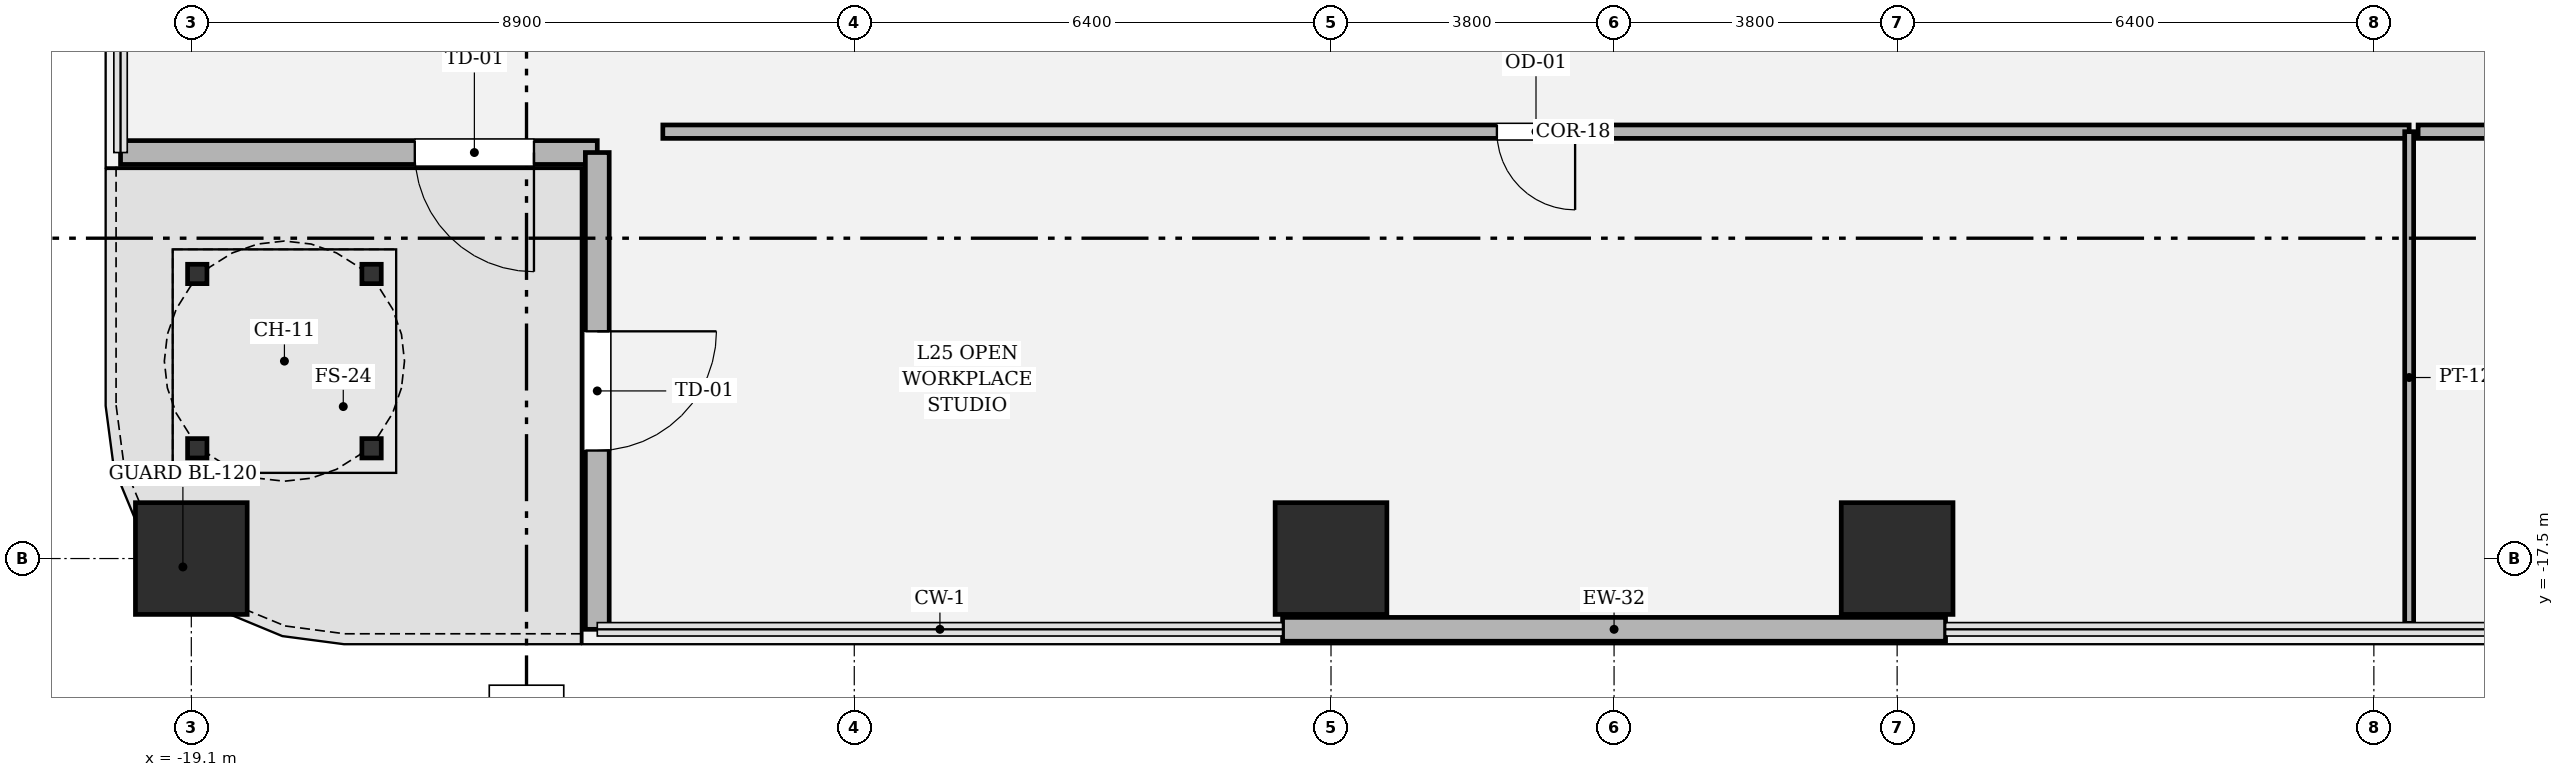
"""IFC4 building model, lengths in metres.
Left out: names, types, materials, properties, quantities, classifications, styles, units other than length and angle.
Written with IfcOpenShell. Run it as: python <this file> out.ifc"""

import sys

from ifc_helpers import new_model, si_unit, direction, frame, frame_2d, origin, origin_2d, place, context, subcontext, project, spatial, rectangle, hollow_rectangle, extrude, element, fill, save


model = new_model("IFC4")
c1 = context("Model", 3, precision=1e-05, world=origin(), true_north=direction((0.0, 1.0)))
c2 = subcontext(c1, "Body", "Model", "MODEL_VIEW")
j1 = project(units=[si_unit("LENGTHUNIT", "METRE"), si_unit("PLANEANGLEUNIT", "RADIAN")], contexts=[c1])
p1 = place(None, origin())
s1 = spatial("IfcSite", under=j1, at=p1, CompositionType="ELEMENT")
p2 = place(p1, origin())
s2 = spatial("IfcBuilding", under=s1, at=p2, CompositionType="ELEMENT")
p3 = place(p2, frame((0.0, 0.0, 109.2)))
s3 = spatial("IfcBuildingStorey", under=s2, at=p3, CompositionType="ELEMENT", Elevation=109.2)
for number, where, z_axis, x_axis in (
    (1, (-19.1, -17.5, 0.0), (0.0, 0.0, 1.0), (1.0, 0.0, 0.0)),
    (2, (-3.8, -17.5, 0.0), (0.0, 0.0, 1.0), (1.0, 0.0, 0.0)),
    (3, (3.8, -17.5, 0.0), (0.0, 0.0, 1.0), (1.0, 0.0, 0.0)),
):
    element("IfcColumn", number, at=place(p3, frame(where, z_axis=z_axis, x_axis=x_axis)), inside=s3, PredefinedType="COLUMN", context=c2, shape_type="SweptSolid", body=[
        extrude(hollow_rectangle(XDim=1.5, YDim=1.5, WallThickness=0.045, at=origin_2d()), origin(), (0.0, 0.0, 1.0), 4.05),
    ])
p4 = place(p3, frame((-4.45, -18.45, 0.0), z_axis=(0.0, 0.0, 1.0), x_axis=(1.0, 0.0, 0.0)))
e4 = element("IfcWall", 4, at=p4, inside=s3, PredefinedType="SOLIDWALL", context=c2, shape_type="SweptSolid", body=[
    extrude(rectangle(XDim=8.9, YDim=0.32, at=frame_2d((4.45, 0.0))), origin(), (0.0, 0.0, 1.0), 3.81),
])
p5 = place(p3, frame((-20.05, -12.05, 0.0), z_axis=(0.0, 0.0, 1.0), x_axis=(1.0, 0.0, 0.0)))
e5 = element("IfcWall", 5, at=p5, inside=s3, PredefinedType="SOLIDWALL", context=c2, shape_type="SweptSolid", body=[
    extrude(rectangle(XDim=6.4, YDim=0.32, at=frame_2d((3.2, 0.0))), origin(), (0.0, 0.0, 1.0), 3.104),
])
p6 = place(p5, frame((3.95, 0.0, 0.0)))
e6 = element("IfcOpeningElement", 6, at=p6, cuts=e5, PredefinedType="OPENING", context=c2, shape_type="SweptSolid", body=[
    extrude(rectangle(XDim=1.6, YDim=2.35, at=frame_2d((0.8, 1.175))), frame((0.0, 0.17, 0.0), z_axis=(0.0, -1.0, 0.0), x_axis=(1.0, 0.0, 0.0)), (0.0, 0.0, 1.0), 0.34),
])
p7 = place(p3, frame((-13.65, -12.05, 0.0), z_axis=(0.0, 0.0, 1.0), x_axis=(0.0, -1.0, 0.0)))
e7 = element("IfcWall", 7, at=p7, inside=s3, PredefinedType="SOLIDWALL", context=c2, shape_type="SweptSolid", body=[
    extrude(rectangle(XDim=6.4, YDim=0.32, at=frame_2d((3.2, 0.0))), origin(), (0.0, 0.0, 1.0), 3.104),
])
p8 = place(p7, frame((2.4, 0.0, 0.0)))
e8 = element("IfcOpeningElement", 8, at=p8, cuts=e7, PredefinedType="OPENING", context=c2, shape_type="SweptSolid", body=[
    extrude(rectangle(XDim=1.6, YDim=2.35, at=frame_2d((0.8, 1.175))), frame((0.0, 0.17, 0.0), z_axis=(0.0, -1.0, 0.0), x_axis=(1.0, 0.0, 0.0)), (0.0, 0.0, 1.0), 0.34),
])
p9 = place(p3, frame((-12.77, -11.77, 0.0), z_axis=(0.0, 0.0, 1.0), x_axis=(1.0, 0.0, 0.0)))
e9 = element("IfcWall", 9, at=p9, inside=s3, PredefinedType="PARTITIONING", context=c2, shape_type="SweptSolid", body=[
    extrude(rectangle(XDim=23.444, YDim=0.18, at=frame_2d((11.722, 0.0))), origin(), (0.0, 0.0, 1.0), 3.104),
])
p10 = place(p9, frame((11.197, 0.0, 0.0)))
e10 = element("IfcOpeningElement", 10, at=p10, cuts=e9, PredefinedType="OPENING", context=c2, shape_type="SweptSolid", body=[
    extrude(rectangle(XDim=1.05, YDim=2.2, at=frame_2d((0.525, 1.1))), frame((0.0, 0.1, 0.0), z_axis=(0.0, -1.0, 0.0), x_axis=(1.0, 0.0, 0.0)), (0.0, 0.0, 1.0), 0.2),
])
p11 = place(p3, frame((10.674, -11.77, 0.0), z_axis=(0.0, 0.0, 1.0), x_axis=(0.0, -1.0, 0.0)))
e11 = element("IfcWall", 11, at=p11, inside=s3, PredefinedType="PARTITIONING", context=c2, shape_type="SweptSolid", body=[
    extrude(rectangle(XDim=6.6, YDim=0.12, at=frame_2d((3.3, 0.0))), origin(), (0.0, 0.0, 1.0), 3.104),
])
p12 = place(p3, frame((10.794, -11.77, 0.0), z_axis=(0.0, 0.0, 1.0), x_axis=(1.0, 0.0, 0.0)))
e12 = element("IfcWall", 12, at=p12, inside=s3, PredefinedType="PARTITIONING", context=c2, shape_type="SweptSolid", body=[
    extrude(rectangle(XDim=5.476, YDim=0.18, at=frame_2d((2.738, 0.0))), origin(), (0.0, 0.0, 1.0), 3.354),
])
p13 = place(p12, frame((2.213, 0.0, 0.0)))
e13 = element("IfcOpeningElement", 13, at=p13, cuts=e12, PredefinedType="OPENING", context=c2, shape_type="SweptSolid", body=[
    extrude(rectangle(XDim=1.05, YDim=2.2, at=frame_2d((0.525, 1.1))), frame((0.0, 0.1, 0.0), z_axis=(0.0, -1.0, 0.0), x_axis=(1.0, 0.0, 0.0)), (0.0, 0.0, 1.0), 0.2),
])
p14 = place(p6, origin())
e14 = element("IfcDoor", 14, at=p14, inside=s3, OperationType="SINGLE_SWING_RIGHT", PredefinedType="DOOR", context=c2, shape_type="SweptSolid", body=[
    extrude(rectangle(XDim=1.6, YDim=2.35, at=frame_2d((0.8, 1.175))), frame((0.0, 0.025, 0.0), z_axis=(0.0, -1.0, 0.0), x_axis=(1.0, 0.0, 0.0)), (0.0, 0.0, 1.0), 0.05),
])
fill(e6, e14)
p15 = place(p8, origin())
e15 = element("IfcDoor", 15, at=p15, inside=s3, OperationType="SINGLE_SWING_LEFT", PredefinedType="DOOR", context=c2, shape_type="SweptSolid", body=[
    extrude(rectangle(XDim=1.6, YDim=2.35, at=frame_2d((0.8, 1.175))), frame((0.0, 0.025, 0.0), z_axis=(0.0, -1.0, 0.0), x_axis=(1.0, 0.0, 0.0)), (0.0, 0.0, 1.0), 0.05),
])
fill(e8, e15)
p16 = place(p10, origin())
e16 = element("IfcDoor", 16, at=p16, inside=s3, OperationType="SINGLE_SWING_RIGHT", PredefinedType="DOOR", context=c2, shape_type="SweptSolid", body=[
    extrude(rectangle(XDim=1.05, YDim=2.2, at=frame_2d((0.525, 1.1))), frame((0.0, 0.025, 0.0), z_axis=(0.0, -1.0, 0.0), x_axis=(1.0, 0.0, 0.0)), (0.0, 0.0, 1.0), 0.05),
])
fill(e10, e16)
save(model, sys.argv[1])
